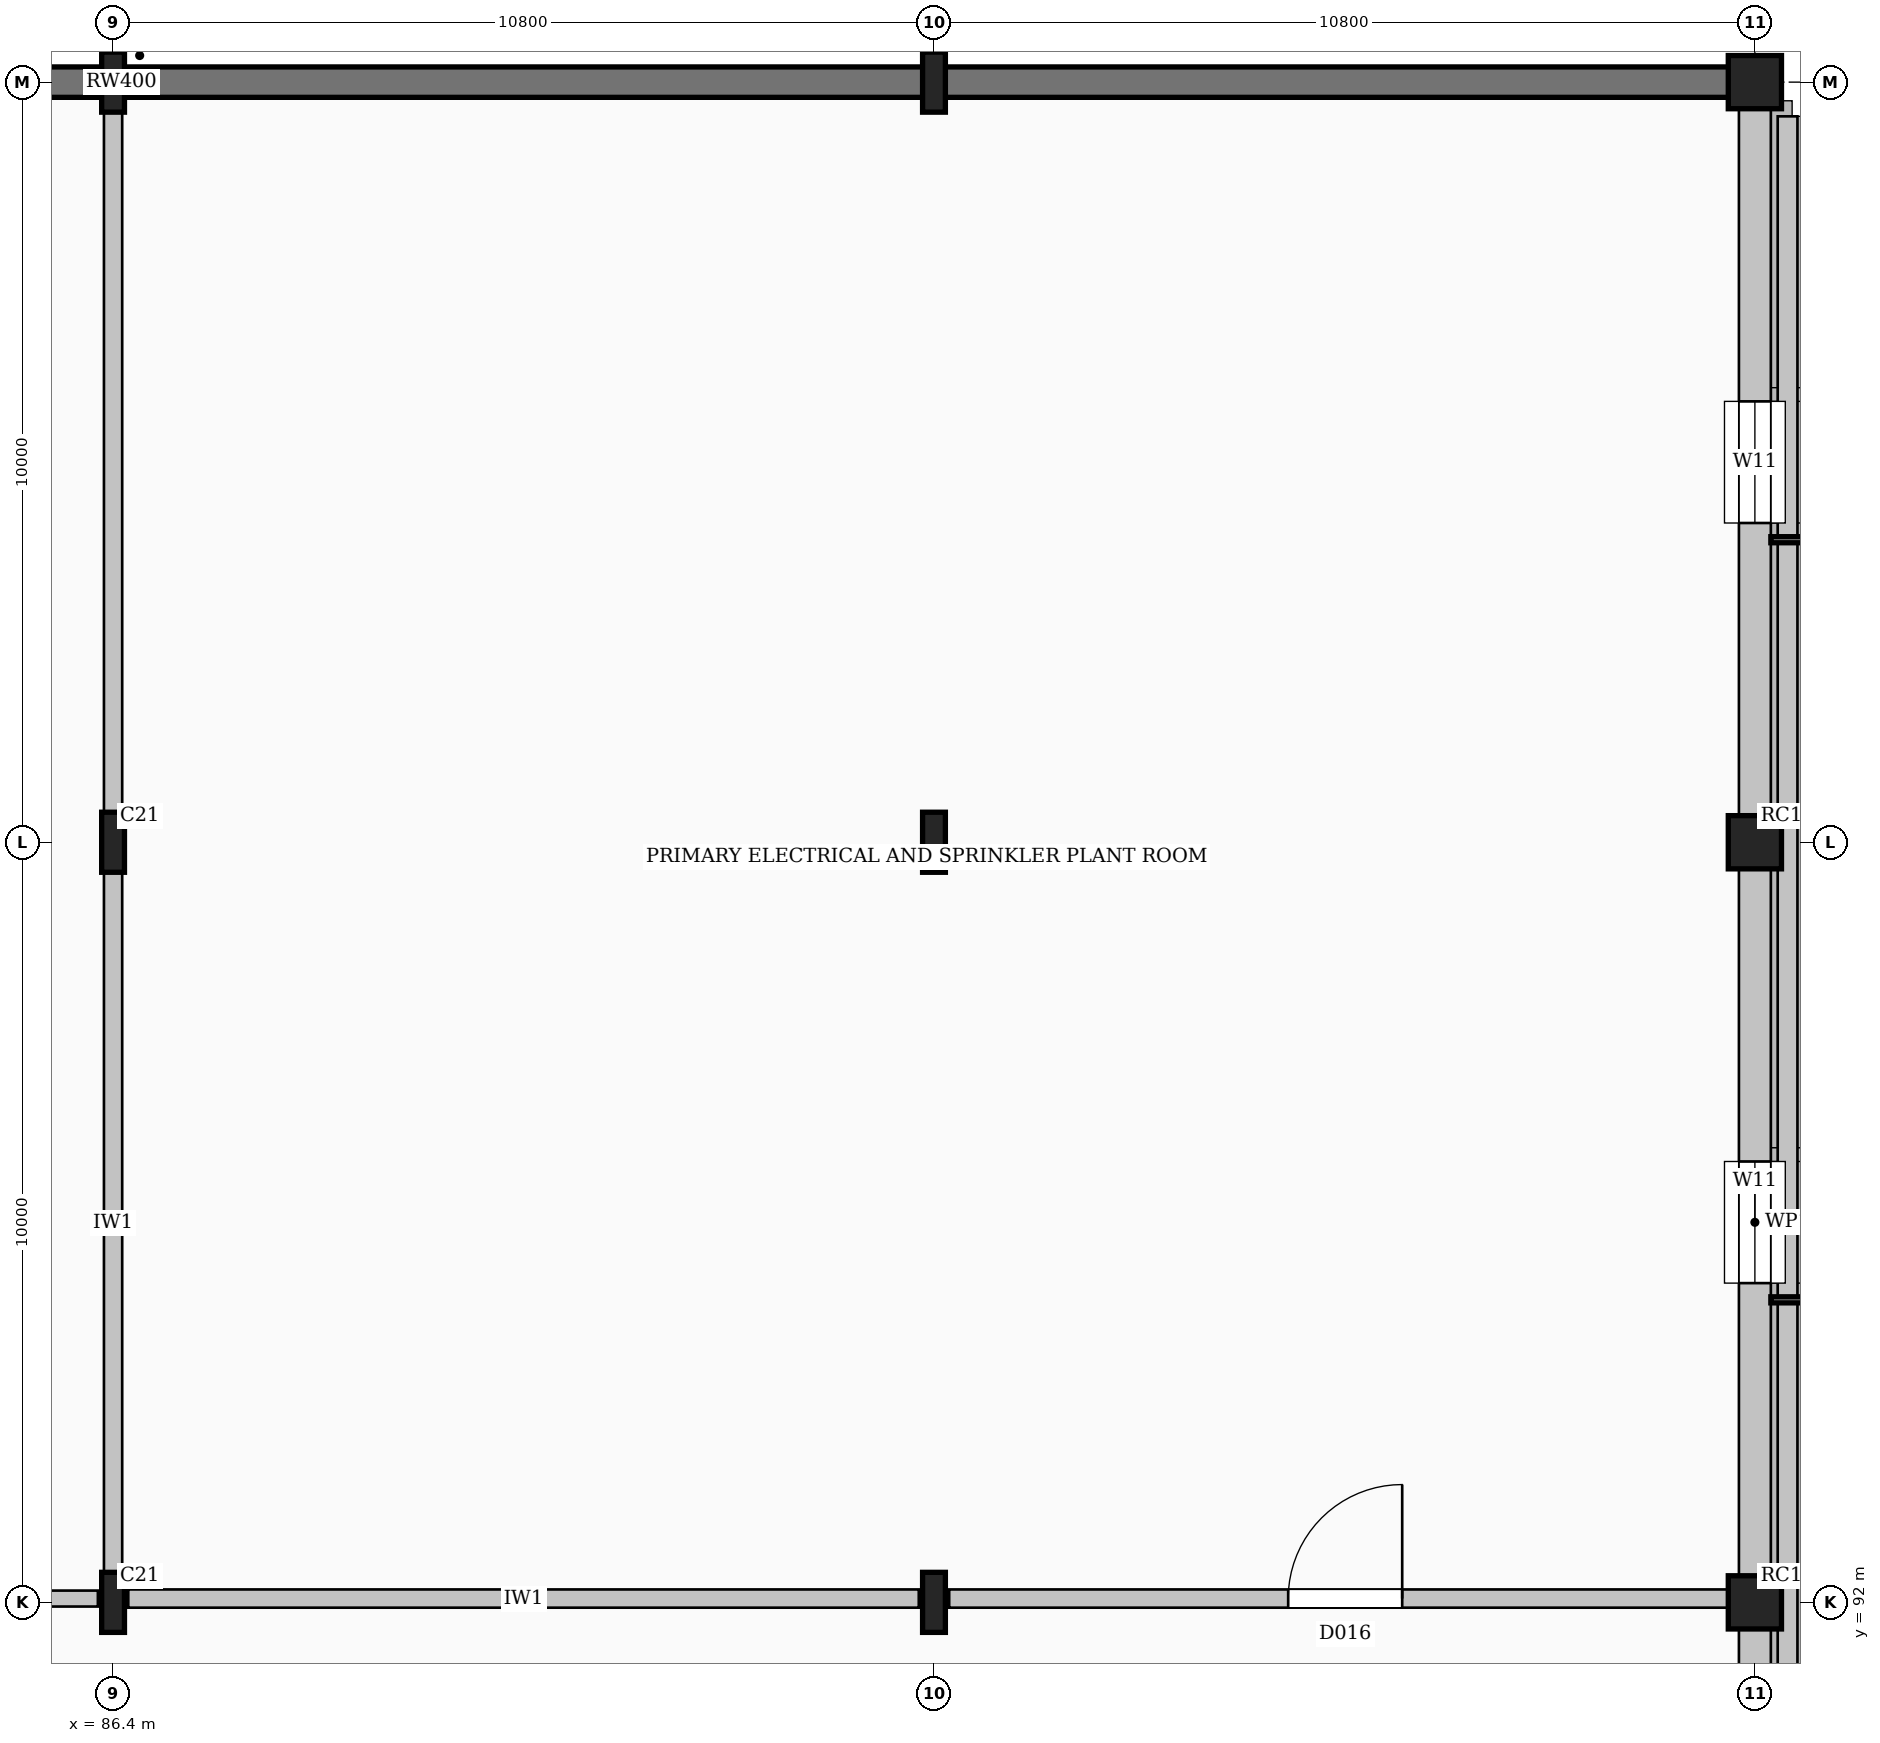
"""IFC4 building model, lengths in metres.
Left out: names, types, materials, properties, quantities, classifications, styles, units other than length and angle.
Written with IfcOpenShell. Run it as: python <this file> out.ifc"""

import sys

from ifc_helpers import new_model, si_unit, direction, frame, frame_2d, origin, origin_2d, place, context, subcontext, project, spatial, rectangle, i_section, extrude, element, fill, save


model = new_model("IFC4")
c1 = context("Model", 3, precision=1e-05, world=origin(), true_north=direction((0.0, 1.0)))
c2 = subcontext(c1, "Body", "Model", "MODEL_VIEW")
j1 = project(units=[si_unit("LENGTHUNIT", "METRE"), si_unit("PLANEANGLEUNIT", "RADIAN")], contexts=[c1])
p1 = place(None, origin())
s1 = spatial("IfcSite", under=j1, at=p1, CompositionType="ELEMENT")
p2 = place(p1, origin())
s2 = spatial("IfcBuilding", under=s1, at=p2, CompositionType="ELEMENT")
p3 = place(p2, origin())
s3 = spatial("IfcBuildingStorey", under=s2, at=p3, CompositionType="ELEMENT", Elevation=0.0)
p4 = place(p3, frame((64.8, 112.0, 0.0), z_axis=(0.0, 0.0, 1.0), x_axis=(1.0, 0.0, 0.0)))
e1 = element("IfcWall", 1, at=p4, inside=s3, PredefinedType="USERDEFINED", context=c2, shape_type="SweptSolid", body=[
    extrude(rectangle(XDim=43.42, YDim=0.4, at=frame_2d((21.71, 0.0))), origin(), (0.0, 0.0, 1.0), 4.56),
])
for number, where, z_axis, x_axis in (
    (2, (86.4, 92.0, 0.0), (0.0, 0.0, 1.0), (1.0, 0.0, 0.0)),
    (3, (86.4, 102.0, 0.0), (0.0, 0.0, 1.0), (1.0, 0.0, 0.0)),
    (4, (86.4, 112.0, 0.0), (0.0, 0.0, 1.0), (1.0, 0.0, 0.0)),
    (5, (97.2, 92.0, 0.0), (0.0, 0.0, 1.0), (1.0, 0.0, 0.0)),
    (6, (97.2, 102.0, 0.0), (0.0, 0.0, 1.0), (1.0, 0.0, 0.0)),
    (7, (97.2, 112.0, 0.0), (0.0, 0.0, 1.0), (1.0, 0.0, 0.0)),
):
    element("IfcColumn", number, at=place(p3, frame(where, z_axis=z_axis, x_axis=x_axis)), inside=s3, PredefinedType="COLUMN", context=c2, shape_type="SweptSolid", body=[
        extrude(i_section(OverallWidth=0.3, OverallDepth=0.79, WebThickness=0.015, FlangeThickness=0.028, FilletRadius=0.03, at=origin_2d()), origin(), (0.0, 0.0, 1.0), 4.8),
    ])
for number, where, z_axis, x_axis in (
    (8, (108.0, 92.0, 0.0), (0.0, 0.0, 1.0), (1.0, 0.0, 0.0)),
    (9, (108.0, 102.0, 0.0), (0.0, 0.0, 1.0), (1.0, 0.0, 0.0)),
    (10, (108.0, 112.0, 0.0), (0.0, 0.0, 1.0), (1.0, 0.0, 0.0)),
):
    element("IfcColumn", number, at=place(p3, frame(where, z_axis=z_axis, x_axis=x_axis)), inside=s3, PredefinedType="COLUMN", context=c2, shape_type="SweptSolid", body=[
        extrude(rectangle(XDim=0.7, YDim=0.7, at=origin_2d()), origin(), (0.0, 0.0, 1.0), 4.8),
    ])
p5 = place(p3, frame((108.43, 82.45, -1.38), z_axis=(0.0, 0.0, 1.0), x_axis=(0.0, 1.0, 0.0)))
e11 = element("IfcWall", 11, at=p5, inside=s3, PredefinedType="PARAPET", context=c2, shape_type="SweptSolid", body=[
    extrude(rectangle(XDim=29.1, YDim=0.26, at=frame_2d((14.55, 0.0))), origin(), (0.0, 0.0, 1.0), 5.92),
])
p6 = place(p3, frame((108.0, 82.145, 0.0), z_axis=(0.0, 0.0, 1.0), x_axis=(0.0, 1.0, 0.0)))
e12 = element("IfcWall", 12, at=p6, inside=s3, PredefinedType="STANDARD", context=c2, shape_type="SweptSolid", body=[
    extrude(rectangle(XDim=9.71, YDim=0.42, at=frame_2d((4.855, 0.0))), origin(), (0.0, 0.0, 1.0), 4.009),
])
p7 = place(p6, frame((4.055, 0.0, 1.2)))
e13 = element("IfcOpeningElement", 13, at=p7, cuts=e12, PredefinedType="OPENING", context=c2, shape_type="SweptSolid", body=[
    extrude(rectangle(XDim=1.6, YDim=1.8, at=frame_2d((0.8, 0.9))), frame((0.0, 0.22, 0.0), z_axis=(0.0, -1.0, 0.0), x_axis=(1.0, 0.0, 0.0)), (0.0, 0.0, 1.0), 0.44),
])
p8 = place(p3, frame((108.0, 92.145, 0.0), z_axis=(0.0, 0.0, 1.0), x_axis=(0.0, 1.0, 0.0)))
e14 = element("IfcWall", 14, at=p8, inside=s3, PredefinedType="STANDARD", context=c2, shape_type="SweptSolid", body=[
    extrude(rectangle(XDim=9.71, YDim=0.42, at=frame_2d((4.855, 0.0))), origin(), (0.0, 0.0, 1.0), 4.009),
])
p9 = place(p8, frame((4.055, 0.0, 1.2)))
e15 = element("IfcOpeningElement", 15, at=p9, cuts=e14, PredefinedType="OPENING", context=c2, shape_type="SweptSolid", body=[
    extrude(rectangle(XDim=1.6, YDim=1.8, at=frame_2d((0.8, 0.9))), frame((0.0, 0.22, 0.0), z_axis=(0.0, -1.0, 0.0), x_axis=(1.0, 0.0, 0.0)), (0.0, 0.0, 1.0), 0.44),
])
p10 = place(p3, frame((108.0, 102.145, 0.0), z_axis=(0.0, 0.0, 1.0), x_axis=(0.0, 1.0, 0.0)))
e16 = element("IfcWall", 16, at=p10, inside=s3, PredefinedType="STANDARD", context=c2, shape_type="SweptSolid", body=[
    extrude(rectangle(XDim=9.71, YDim=0.42, at=frame_2d((4.855, 0.0))), origin(), (0.0, 0.0, 1.0), 4.009),
])
p11 = place(p10, frame((4.055, 0.0, 1.2)))
e17 = element("IfcOpeningElement", 17, at=p11, cuts=e16, PredefinedType="OPENING", context=c2, shape_type="SweptSolid", body=[
    extrude(rectangle(XDim=1.6, YDim=1.8, at=frame_2d((0.8, 0.9))), frame((0.0, 0.22, 0.0), z_axis=(0.0, -1.0, 0.0), x_axis=(1.0, 0.0, 0.0)), (0.0, 0.0, 1.0), 0.44),
])
p12 = place(p3, frame((75.8, 92.05, 0.0), z_axis=(0.0, 0.0, 1.0), x_axis=(1.0, 0.0, 0.0)))
e18 = element("IfcWall", 18, at=p12, inside=s3, PredefinedType="PARTITIONING", context=c2, shape_type="SweptSolid", body=[
    extrude(rectangle(XDim=10.4, YDim=0.21, at=frame_2d((5.2, 0.0))), origin(), (0.0, 0.0, 1.0), 4.069),
])
p13 = place(p3, frame((86.6, 92.05, 0.0), z_axis=(0.0, 0.0, 1.0), x_axis=(1.0, 0.0, 0.0)))
e19 = element("IfcWall", 19, at=p13, inside=s3, PredefinedType="SOLIDWALL", context=c2, shape_type="SweptSolid", body=[
    extrude(rectangle(XDim=10.4, YDim=0.24, at=frame_2d((5.2, 0.0))), origin(), (0.0, 0.0, 1.0), 4.069),
])
p14 = place(p3, frame((97.4, 92.05, 0.0), z_axis=(0.0, 0.0, 1.0), x_axis=(1.0, 0.0, 0.0)))
e20 = element("IfcWall", 20, at=p14, inside=s3, PredefinedType="SOLIDWALL", context=c2, shape_type="SweptSolid", body=[
    extrude(rectangle(XDim=10.42, YDim=0.24, at=frame_2d((5.21, 0.0))), origin(), (0.0, 0.0, 1.0), 4.069),
])
p15 = place(p14, frame((4.46, 0.0, 0.0)))
e21 = element("IfcOpeningElement", 21, at=p15, cuts=e20, PredefinedType="OPENING", context=c2, shape_type="SweptSolid", body=[
    extrude(rectangle(XDim=1.5, YDim=2.3, at=frame_2d((0.75, 1.15))), frame((0.0, 0.13, 0.0), z_axis=(0.0, -1.0, 0.0), x_axis=(1.0, 0.0, 0.0)), (0.0, 0.0, 1.0), 0.26),
])
for number, where, z_axis, x_axis in (
    (22, (86.4, 92.18, 0.0), (0.0, 0.0, 1.0), (0.0, 1.0, 0.0)),
    (23, (86.4, 102.2, 0.0), (0.0, 0.0, 1.0), (0.0, 1.0, 0.0)),
):
    element("IfcWall", number, at=place(p3, frame(where, z_axis=z_axis, x_axis=x_axis)), inside=s3, PredefinedType="SOLIDWALL", context=c2, shape_type="SweptSolid", body=[
        extrude(rectangle(XDim=9.62, YDim=0.24, at=frame_2d((4.81, 0.0))), origin(), (0.0, 0.0, 1.0), 4.06),
    ])
p16 = place(p9, origin())
e24 = element("IfcWindow", 24, at=p16, inside=s3, PartitioningType="SINGLE_PANEL", PredefinedType="WINDOW", context=c2, shape_type="SweptSolid", body=[
    extrude(rectangle(XDim=1.6, YDim=1.8, at=frame_2d((0.8, 0.9))), frame((0.0, 0.03, 0.0), z_axis=(0.0, -1.0, 0.0), x_axis=(1.0, 0.0, 0.0)), (0.0, 0.0, 1.0), 0.06),
])
fill(e15, e24)
p17 = place(p11, origin())
e25 = element("IfcWindow", 25, at=p17, inside=s3, PartitioningType="SINGLE_PANEL", PredefinedType="WINDOW", context=c2, shape_type="SweptSolid", body=[
    extrude(rectangle(XDim=1.6, YDim=1.8, at=frame_2d((0.8, 0.9))), frame((0.0, 0.03, 0.0), z_axis=(0.0, -1.0, 0.0), x_axis=(1.0, 0.0, 0.0)), (0.0, 0.0, 1.0), 0.06),
])
fill(e17, e25)
p18 = place(p15, origin())
e26 = element("IfcDoor", 26, at=p18, inside=s3, OperationType="SINGLE_SWING_RIGHT", PredefinedType="DOOR", context=c2, shape_type="SweptSolid", body=[
    extrude(rectangle(XDim=1.5, YDim=2.3, at=frame_2d((0.75, 1.15))), frame((0.0, 0.025, 0.0), z_axis=(0.0, -1.0, 0.0), x_axis=(1.0, 0.0, 0.0)), (0.0, 0.0, 1.0), 0.05),
])
fill(e21, e26)
save(model, sys.argv[1])
